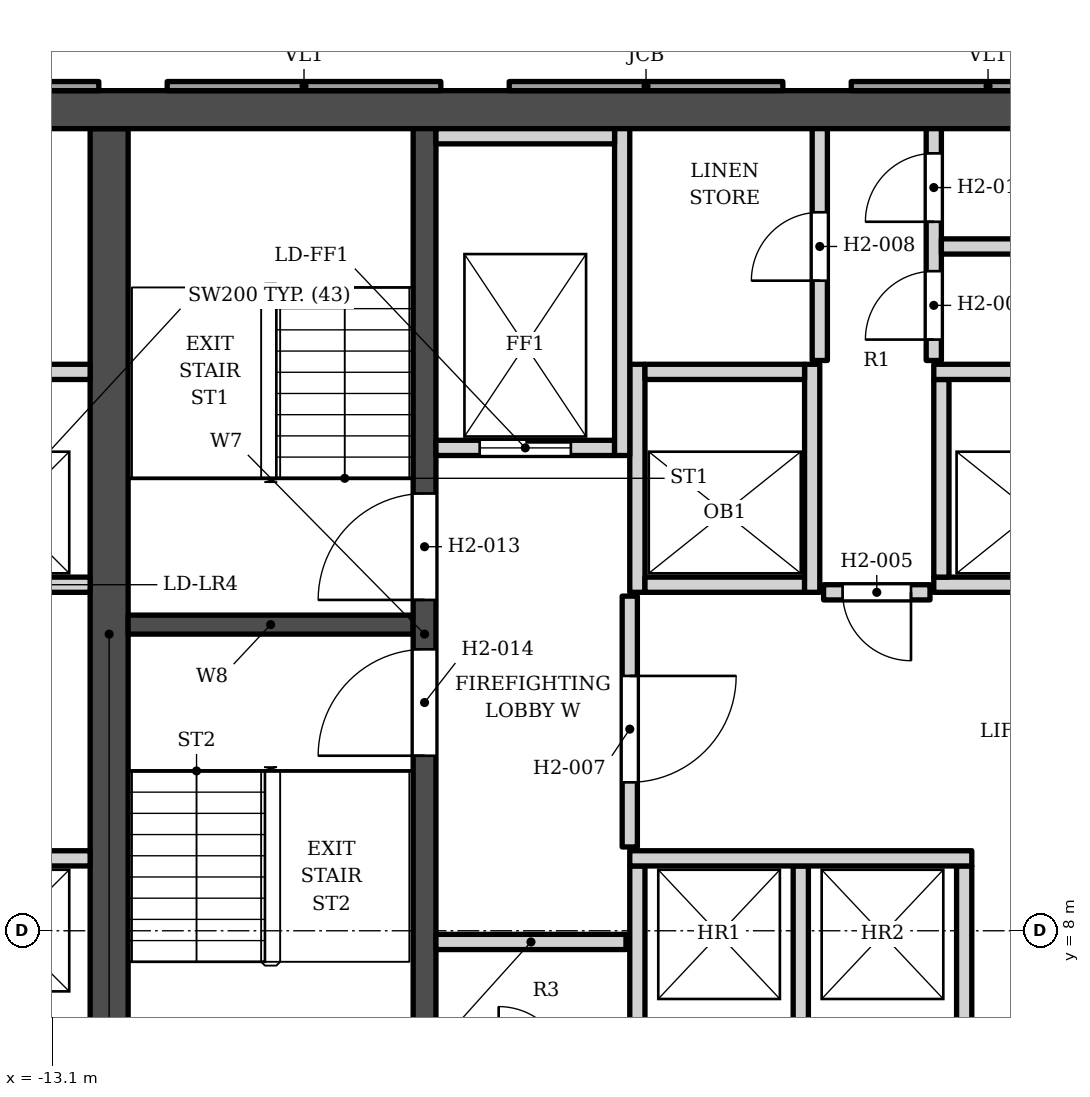
"""IFC4 building model, lengths in metres.
Left out: names, types, materials, properties, quantities, classifications, styles, units other than length and angle.
Written with IfcOpenShell. Run it as: python <this file> out.ifc"""

import sys

from ifc_helpers import new_model, si_unit, direction, frame, frame_2d, origin, place, context, subcontext, project, spatial, polyline, rectangle, outline, extrude, element, fill, save


model = new_model("IFC4")
c1 = context("Model", 3, precision=1e-05, world=origin(), true_north=direction((0.0, 1.0)))
c2 = subcontext(c1, "Body", "Model", "MODEL_VIEW")
j1 = project(units=[si_unit("LENGTHUNIT", "METRE"), si_unit("PLANEANGLEUNIT", "RADIAN")], contexts=[c1])
p1 = place(None, origin())
s1 = spatial("IfcSite", under=j1, at=p1, CompositionType="ELEMENT")
p2 = place(p1, origin())
s2 = spatial("IfcBuilding", under=s1, at=p2, CompositionType="ELEMENT")
p3 = place(p2, frame((0.0, 0.0, 56.2)))
s3 = spatial("IfcBuildingStorey", under=s2, at=p3, CompositionType="ELEMENT", Elevation=56.2)
p4 = place(p3, frame((-16.9, 18.802, 0.0), z_axis=(0.0, 0.0, 1.0), x_axis=(1.0, 0.0, 0.0)))
e1 = element("IfcWall", 1, at=p4, inside=s3, PredefinedType="SHEAR", context=c2, shape_type="SweptSolid", body=[
    extrude(rectangle(XDim=33.8, YDim=0.5, at=frame_2d((16.9, 0.0))), origin(), (0.0, 0.0, 1.0), 3.4),
])
p5 = place(p3, frame((-12.35, 5.253, 0.0), z_axis=(0.0, 0.0, 1.0), x_axis=(0.0, 1.0, 0.0)))
e2 = element("IfcWall", 2, at=p5, inside=s3, PredefinedType="SHEAR", context=c2, shape_type="SweptSolid", body=[
    extrude(rectangle(XDim=13.3, YDim=0.5, at=frame_2d((6.65, 0.0))), origin(), (0.0, 0.0, 1.0), 3.4),
])
p6 = place(p3, frame((-8.2, 5.253, 0.0), z_axis=(0.0, 0.0, 1.0), x_axis=(0.0, 1.0, 0.0)))
e3 = element("IfcWall", 3, at=p6, inside=s3, PredefinedType="SHEAR", context=c2, shape_type="SweptSolid", body=[
    extrude(rectangle(XDim=13.3, YDim=0.3, at=frame_2d((6.65, 0.0))), origin(), (0.0, 0.0, 1.0), 3.4),
])
p7 = place(p6, frame((7.1, 0.0, 0.0)))
e4 = element("IfcOpeningElement", 4, at=p7, cuts=e3, PredefinedType="OPENING", context=c2, shape_type="SweptSolid", body=[
    extrude(rectangle(XDim=1.4, YDim=2.1, at=frame_2d((0.7, 1.05))), frame((0.0, 0.16, 0.0), z_axis=(0.0, -1.0, 0.0), x_axis=(1.0, 0.0, 0.0)), (0.0, 0.0, 1.0), 0.32),
])
p8 = place(p6, frame((5.05, 0.0, 0.0)))
e5 = element("IfcOpeningElement", 5, at=p8, cuts=e3, PredefinedType="OPENING", context=c2, shape_type="SweptSolid", body=[
    extrude(rectangle(XDim=1.4, YDim=2.1, at=frame_2d((0.7, 1.05))), frame((0.0, 0.16, 0.0), z_axis=(0.0, -1.0, 0.0), x_axis=(1.0, 0.0, 0.0)), (0.0, 0.0, 1.0), 0.32),
])
p9 = place(p3, frame((-12.1, 12.028, 0.0), z_axis=(0.0, 0.0, 1.0), x_axis=(1.0, 0.0, 0.0)))
e6 = element("IfcWall", 6, at=p9, inside=s3, PredefinedType="SHEAR", context=c2, shape_type="SweptSolid", body=[
    extrude(rectangle(XDim=3.75, YDim=0.25, at=frame_2d((1.875, 0.0))), origin(), (0.0, 0.0, 1.0), 3.4),
])
p10 = place(p3, origin())
e7 = element("IfcWall", 7, at=p10, inside=s3, PredefinedType="ELEMENTEDWALL", context=c2, shape_type="SweptSolid", body=[
    extrude(outline(polyline([(-2.586, 19.173), (-2.586, 19.052), (1.014, 19.052), (1.014, 19.173), (-2.586, 19.173)])), origin(), (0.0, 0.0, 1.0), 2.65),
])
p11 = place(p3, origin())
e8 = element("IfcWall", 8, at=p11, inside=s3, PredefinedType="SOLIDWALL", context=c2, shape_type="SweptSolid", body=[
    extrude(outline(polyline([(-7.086, 19.173), (-7.086, 19.052), (-3.486, 19.052), (-3.486, 19.173), (-7.086, 19.173)])), origin(), (0.0, 0.0, 1.0), 2.65),
])
p12 = place(p3, origin())
e9 = element("IfcWall", 9, at=p12, inside=s3, PredefinedType="ELEMENTEDWALL", context=c2, shape_type="SweptSolid", body=[
    extrude(outline(polyline([(-11.586, 19.173), (-11.586, 19.052), (-7.986, 19.052), (-7.986, 19.173), (-11.586, 19.173)])), origin(), (0.0, 0.0, 1.0), 2.65),
])
p13 = place(p3, origin())
e10 = element("IfcWall", 10, at=p13, inside=s3, PredefinedType="SOLIDWALL", context=c2, shape_type="SweptSolid", body=[
    extrude(outline(polyline([(-16.086, 19.173), (-16.086, 19.052), (-12.486, 19.052), (-12.486, 19.173), (-16.086, 19.173)])), origin(), (0.0, 0.0, 1.0), 2.65),
])
for number, where, z_axis, x_axis in (
    (11, (-5.4, 6.353, 0.0), (0.0, 0.0, 1.0), (0.0, 1.0, 0.0)),
    (12, (-3.25, 6.353, 0.0), (0.0, 0.0, 1.0), (0.0, 1.0, 0.0)),
    (13, (-1.1, 6.353, 0.0), (0.0, 0.0, 1.0), (0.0, 1.0, 0.0)),
    (14, (-8.05, 7.853, 0.0), (0.0, 0.0, 1.0), (1.0, 0.0, 0.0)),
):
    element("IfcWall", number, at=place(p3, frame(where, z_axis=z_axis, x_axis=x_axis)), inside=s3, PredefinedType="SOLIDWALL", context=c2, shape_type="SweptSolid", body=[
        extrude(rectangle(XDim=2.5, YDim=0.2, at=frame_2d((1.25, 0.0))), origin(), (0.0, 0.0, 1.0), 3.23),
    ])
p14 = place(p3, frame((-16.9, 8.953, 0.0), z_axis=(0.0, 0.0, 1.0), x_axis=(1.0, 0.0, 0.0)))
e15 = element("IfcWall", 15, at=p14, inside=s3, PredefinedType="SOLIDWALL", context=c2, shape_type="SweptSolid", body=[
    extrude(rectangle(XDim=4.3, YDim=0.2, at=frame_2d((2.15, 0.0))), origin(), (0.0, 0.0, 1.0), 3.23),
])
p15 = place(p14, frame((2.675, 0.0, 0.0)))
e16 = element("IfcOpeningElement", 16, at=p15, cuts=e15, PredefinedType="OPENING", context=c2, shape_type="SweptSolid", body=[
    extrude(rectangle(XDim=1.1, YDim=2.1, at=frame_2d((0.55, 1.05))), frame((0.0, 0.11, 0.0), z_axis=(0.0, -1.0, 0.0), x_axis=(1.0, 0.0, 0.0)), (0.0, 0.0, 1.0), 0.22),
])
p16 = place(p14, frame((0.425, 0.0, 0.0)))
e17 = element("IfcOpeningElement", 17, at=p16, cuts=e15, PredefinedType="OPENING", context=c2, shape_type="SweptSolid", body=[
    extrude(rectangle(XDim=1.1, YDim=2.1, at=frame_2d((0.55, 1.05))), frame((0.0, 0.11, 0.0), z_axis=(0.0, -1.0, 0.0), x_axis=(1.0, 0.0, 0.0)), (0.0, 0.0, 1.0), 0.22),
])
p17 = place(p3, frame((-5.5, 8.953, 0.0), z_axis=(0.0, 0.0, 1.0), x_axis=(1.0, 0.0, 0.0)))
e18 = element("IfcWall", 18, at=p17, inside=s3, PredefinedType="SOLIDWALL", context=c2, shape_type="SweptSolid", body=[
    extrude(rectangle(XDim=4.5, YDim=0.2, at=frame_2d((2.25, 0.0))), origin(), (0.0, 0.0, 1.0), 3.23),
])
p18 = place(p3, frame((-5.5, 9.103, 0.0), z_axis=(0.0, 0.0, 1.0), x_axis=(0.0, 1.0, 0.0)))
e19 = element("IfcWall", 19, at=p18, inside=s3, PredefinedType="SOLIDWALL", context=c2, shape_type="SweptSolid", body=[
    extrude(rectangle(XDim=3.3, YDim=0.2, at=frame_2d((1.65, 0.0))), origin(), (0.0, 0.0, 1.0), 3.23),
])
p19 = place(p18, frame((0.85, 0.0, 0.0)))
e20 = element("IfcOpeningElement", 20, at=p19, cuts=e19, PredefinedType="OPENING", context=c2, shape_type="SweptSolid", body=[
    extrude(rectangle(XDim=1.4, YDim=2.1, at=frame_2d((0.7, 1.05))), frame((0.0, 0.11, 0.0), z_axis=(0.0, -1.0, 0.0), x_axis=(1.0, 0.0, 0.0)), (0.0, 0.0, 1.0), 0.22),
])
p20 = place(p3, frame((-2.95, 12.453, 0.0), z_axis=(0.0, 0.0, 1.0), x_axis=(1.0, 0.0, 0.0)))
e21 = element("IfcWall", 21, at=p20, inside=s3, PredefinedType="SOLIDWALL", context=c2, shape_type="SweptSolid", body=[
    extrude(rectangle(XDim=1.4, YDim=0.2, at=frame_2d((0.7, 0.0))), origin(), (0.0, 0.0, 1.0), 3.23),
])
p21 = place(p20, frame((0.25, 0.0, 0.0)))
e22 = element("IfcOpeningElement", 22, at=p21, cuts=e21, PredefinedType="OPENING", context=c2, shape_type="SweptSolid", body=[
    extrude(rectangle(XDim=0.9, YDim=2.1, at=frame_2d((0.45, 1.05))), frame((0.0, 0.11, 0.0), z_axis=(0.0, -1.0, 0.0), x_axis=(1.0, 0.0, 0.0)), (0.0, 0.0, 1.0), 0.22),
])
p22 = place(p3, frame((-16.9, 12.552, 0.0), z_axis=(0.0, 0.0, 1.0), x_axis=(1.0, 0.0, 0.0)))
e23 = element("IfcWall", 23, at=p22, inside=s3, PredefinedType="SOLIDWALL", context=c2, shape_type="SweptSolid", body=[
    extrude(rectangle(XDim=4.3, YDim=0.2, at=frame_2d((2.15, 0.0))), origin(), (0.0, 0.0, 1.0), 3.23),
])
p23 = place(p22, frame((2.675, 0.0, 0.0)))
e24 = element("IfcOpeningElement", 24, at=p23, cuts=e23, PredefinedType="OPENING", context=c2, shape_type="SweptSolid", body=[
    extrude(rectangle(XDim=1.1, YDim=2.1, at=frame_2d((0.55, 1.05))), frame((0.0, 0.11, 0.0), z_axis=(0.0, -1.0, 0.0), x_axis=(1.0, 0.0, 0.0)), (0.0, 0.0, 1.0), 0.22),
])
p24 = place(p22, frame((0.425, 0.0, 0.0)))
e25 = element("IfcOpeningElement", 25, at=p24, cuts=e23, PredefinedType="OPENING", context=c2, shape_type="SweptSolid", body=[
    extrude(rectangle(XDim=1.1, YDim=2.1, at=frame_2d((0.55, 1.05))), frame((0.0, 0.11, 0.0), z_axis=(0.0, -1.0, 0.0), x_axis=(1.0, 0.0, 0.0)), (0.0, 0.0, 1.0), 0.22),
])
p25 = place(p3, frame((-5.4, 12.453, 0.0), z_axis=(0.0, 0.0, 1.0), x_axis=(0.0, 1.0, 0.0)))
e26 = element("IfcWall", 26, at=p25, inside=s3, PredefinedType="SOLIDWALL", context=c2, shape_type="SweptSolid", body=[
    extrude(rectangle(XDim=3.0, YDim=0.2, at=frame_2d((1.5, 0.0))), origin(), (0.0, 0.0, 1.0), 3.23),
])
p26 = place(p3, frame((-5.3, 12.552, 0.0), z_axis=(0.0, 0.0, 1.0), x_axis=(1.0, 0.0, 0.0)))
e27 = element("IfcWall", 27, at=p26, inside=s3, PredefinedType="SOLIDWALL", context=c2, shape_type="SweptSolid", body=[
    extrude(rectangle(XDim=2.1, YDim=0.2, at=frame_2d((1.05, 0.0))), origin(), (0.0, 0.0, 1.0), 3.23),
])
p27 = place(p3, frame((-3.1, 12.453, 0.0), z_axis=(0.0, 0.0, 1.0), x_axis=(0.0, 1.0, 0.0)))
e28 = element("IfcWall", 28, at=p27, inside=s3, PredefinedType="SOLIDWALL", context=c2, shape_type="SweptSolid", body=[
    extrude(rectangle(XDim=3.0, YDim=0.2, at=frame_2d((1.5, 0.0))), origin(), (0.0, 0.0, 1.0), 3.23),
])
p28 = place(p3, frame((-1.5, 12.552, 0.0), z_axis=(0.0, 0.0, 1.0), x_axis=(1.0, 0.0, 0.0)))
e29 = element("IfcWall", 29, at=p28, inside=s3, PredefinedType="SOLIDWALL", context=c2, shape_type="SweptSolid", body=[
    extrude(rectangle(XDim=7.0, YDim=0.2, at=frame_2d((3.5, 0.0))), origin(), (0.0, 0.0, 1.0), 3.23),
])
p29 = place(p3, frame((-1.4, 12.653, 0.0), z_axis=(0.0, 0.0, 1.0), x_axis=(0.0, 1.0, 0.0)))
e30 = element("IfcWall", 30, at=p29, inside=s3, PredefinedType="SOLIDWALL", context=c2, shape_type="SweptSolid", body=[
    extrude(rectangle(XDim=2.6, YDim=0.2, at=frame_2d((1.3, 0.0))), origin(), (0.0, 0.0, 1.0), 3.23),
])
p30 = place(p3, frame((-8.05, 14.353, 0.0), z_axis=(0.0, 0.0, 1.0), x_axis=(1.0, 0.0, 0.0)))
e31 = element("IfcWall", 31, at=p30, inside=s3, PredefinedType="SOLIDWALL", context=c2, shape_type="SweptSolid", body=[
    extrude(rectangle(XDim=2.35, YDim=0.2, at=frame_2d((1.175, 0.0))), origin(), (0.0, 0.0, 1.0), 3.23),
])
p31 = place(p30, frame((0.575, 0.0, 0.0)))
e32 = element("IfcOpeningElement", 32, at=p31, cuts=e31, PredefinedType="OPENING", context=c2, shape_type="SweptSolid", body=[
    extrude(rectangle(XDim=1.2, YDim=2.1, at=frame_2d((0.6, 1.05))), frame((0.0, 0.11, 0.0), z_axis=(0.0, -1.0, 0.0), x_axis=(1.0, 0.0, 0.0)), (0.0, 0.0, 1.0), 0.22),
])
for number, where, z_axis, x_axis in (
    (33, (-5.6, 14.253, 0.0), (0.0, 0.0, 1.0), (0.0, 1.0, 0.0)),
    (34, (-16.9, 15.353, 0.0), (0.0, 0.0, 1.0), (1.0, 0.0, 0.0)),
):
    element("IfcWall", number, at=place(p3, frame(where, z_axis=z_axis, x_axis=x_axis)), inside=s3, PredefinedType="SOLIDWALL", context=c2, shape_type="SweptSolid", body=[
        extrude(rectangle(XDim=4.3, YDim=0.2, at=frame_2d((2.15, 0.0))), origin(), (0.0, 0.0, 1.0), 3.23),
    ])
p32 = place(p3, frame((-5.3, 15.353, 0.0), z_axis=(0.0, 0.0, 1.0), x_axis=(1.0, 0.0, 0.0)))
e35 = element("IfcWall", 35, at=p32, inside=s3, PredefinedType="SOLIDWALL", context=c2, shape_type="SweptSolid", body=[
    extrude(rectangle(XDim=2.1, YDim=0.2, at=frame_2d((1.05, 0.0))), origin(), (0.0, 0.0, 1.0), 3.23),
])
p33 = place(p3, frame((-1.5, 15.353, 0.0), z_axis=(0.0, 0.0, 1.0), x_axis=(1.0, 0.0, 0.0)))
e36 = element("IfcWall", 36, at=p33, inside=s3, PredefinedType="SOLIDWALL", context=c2, shape_type="SweptSolid", body=[
    extrude(rectangle(XDim=7.2, YDim=0.2, at=frame_2d((3.6, 0.0))), origin(), (0.0, 0.0, 1.0), 3.23),
])
p34 = place(p3, frame((-3.0, 15.503, 0.0), z_axis=(0.0, 0.0, 1.0), x_axis=(0.0, 1.0, 0.0)))
e37 = element("IfcWall", 37, at=p34, inside=s3, PredefinedType="SOLIDWALL", context=c2, shape_type="SweptSolid", body=[
    extrude(rectangle(XDim=3.05, YDim=0.2, at=frame_2d((1.525, 0.0))), origin(), (0.0, 0.0, 1.0), 3.23),
])
p35 = place(p34, frame((1.05, 0.0, 0.0)))
e38 = element("IfcOpeningElement", 38, at=p35, cuts=e37, PredefinedType="OPENING", context=c2, shape_type="SweptSolid", body=[
    extrude(rectangle(XDim=0.9, YDim=2.1, at=frame_2d((0.45, 1.05))), frame((0.0, 0.11, 0.0), z_axis=(0.0, -1.0, 0.0), x_axis=(1.0, 0.0, 0.0)), (0.0, 0.0, 1.0), 0.22),
])
p36 = place(p3, frame((-1.5, 15.503, 0.0), z_axis=(0.0, 0.0, 1.0), x_axis=(0.0, 1.0, 0.0)))
e39 = element("IfcWall", 39, at=p36, inside=s3, PredefinedType="SOLIDWALL", context=c2, shape_type="SweptSolid", body=[
    extrude(rectangle(XDim=3.05, YDim=0.2, at=frame_2d((1.525, 0.0))), origin(), (0.0, 0.0, 1.0), 3.23),
])
p37 = place(p36, frame((0.275, 0.0, 0.0)))
e40 = element("IfcOpeningElement", 40, at=p37, cuts=e39, PredefinedType="OPENING", context=c2, shape_type="SweptSolid", body=[
    extrude(rectangle(XDim=0.9, YDim=2.1, at=frame_2d((0.45, 1.05))), frame((0.0, 0.11, 0.0), z_axis=(0.0, -1.0, 0.0), x_axis=(1.0, 0.0, 0.0)), (0.0, 0.0, 1.0), 0.22),
])
p38 = place(p36, frame((1.825, 0.0, 0.0)))
e41 = element("IfcOpeningElement", 41, at=p38, cuts=e39, PredefinedType="OPENING", context=c2, shape_type="SweptSolid", body=[
    extrude(rectangle(XDim=0.9, YDim=2.1, at=frame_2d((0.45, 1.05))), frame((0.0, 0.11, 0.0), z_axis=(0.0, -1.0, 0.0), x_axis=(1.0, 0.0, 0.0)), (0.0, 0.0, 1.0), 0.22),
])
p39 = place(p3, frame((-1.4, 17.003, 0.0), z_axis=(0.0, 0.0, 1.0), x_axis=(1.0, 0.0, 0.0)))
e42 = element("IfcWall", 42, at=p39, inside=s3, PredefinedType="SOLIDWALL", context=c2, shape_type="SweptSolid", body=[
    extrude(rectangle(XDim=6.85, YDim=0.2, at=frame_2d((3.425, 0.0))), origin(), (0.0, 0.0, 1.0), 3.23),
])
p40 = place(p3, frame((-8.05, 18.453, 0.0), z_axis=(0.0, 0.0, 1.0), x_axis=(1.0, 0.0, 0.0)))
e43 = element("IfcWall", 43, at=p40, inside=s3, PredefinedType="SOLIDWALL", context=c2, shape_type="SweptSolid", body=[
    extrude(rectangle(XDim=2.35, YDim=0.2, at=frame_2d((1.175, 0.0))), origin(), (0.0, 0.0, 1.0), 3.23),
])
p41 = place(p31, origin())
e44 = element("IfcDoor", 44, at=p41, inside=s3, OperationType="DOUBLE_DOOR_SLIDING", PredefinedType="DOOR", context=c2, shape_type="SweptSolid", body=[
    extrude(rectangle(XDim=1.2, YDim=2.1, at=frame_2d((0.6, 1.05))), frame((0.0, 0.025, 0.0), z_axis=(0.0, -1.0, 0.0), x_axis=(1.0, 0.0, 0.0)), (0.0, 0.0, 1.0), 0.05),
])
fill(e32, e44)
p42 = place(p7, origin())
e45 = element("IfcDoor", 45, at=p42, inside=s3, OperationType="SINGLE_SWING_LEFT", PredefinedType="DOOR", context=c2, shape_type="SweptSolid", body=[
    extrude(rectangle(XDim=1.4, YDim=2.1, at=frame_2d((0.7, 1.05))), frame((0.0, 0.025, 0.0), z_axis=(0.0, -1.0, 0.0), x_axis=(1.0, 0.0, 0.0)), (0.0, 0.0, 1.0), 0.05),
])
fill(e4, e45)
p43 = place(p8, origin())
e46 = element("IfcDoor", 46, at=p43, inside=s3, OperationType="SINGLE_SWING_LEFT", PredefinedType="DOOR", context=c2, shape_type="SweptSolid", body=[
    extrude(rectangle(XDim=1.4, YDim=2.1, at=frame_2d((0.7, 1.05))), frame((0.0, 0.025, 0.0), z_axis=(0.0, -1.0, 0.0), x_axis=(1.0, 0.0, 0.0)), (0.0, 0.0, 1.0), 0.05),
])
fill(e5, e46)
p44 = place(p21, origin())
e47 = element("IfcDoor", 47, at=p44, inside=s3, OperationType="SINGLE_SWING_RIGHT", PredefinedType="DOOR", context=c2, shape_type="SweptSolid", body=[
    extrude(rectangle(XDim=0.9, YDim=2.1, at=frame_2d((0.45, 1.05))), frame((0.0, 0.025, 0.0), z_axis=(0.0, -1.0, 0.0), x_axis=(1.0, 0.0, 0.0)), (0.0, 0.0, 1.0), 0.05),
])
fill(e22, e47)
p45 = place(p19, origin())
e48 = element("IfcDoor", 48, at=p45, inside=s3, OperationType="SINGLE_SWING_RIGHT", PredefinedType="DOOR", context=c2, shape_type="SweptSolid", body=[
    extrude(rectangle(XDim=1.4, YDim=2.1, at=frame_2d((0.7, 1.05))), frame((0.0, 0.025, 0.0), z_axis=(0.0, -1.0, 0.0), x_axis=(1.0, 0.0, 0.0)), (0.0, 0.0, 1.0), 0.05),
])
fill(e20, e48)
p46 = place(p35, origin())
e49 = element("IfcDoor", 49, at=p46, inside=s3, OperationType="SINGLE_SWING_LEFT", PredefinedType="DOOR", context=c2, shape_type="SweptSolid", body=[
    extrude(rectangle(XDim=0.9, YDim=2.1, at=frame_2d((0.45, 1.05))), frame((0.0, 0.025, 0.0), z_axis=(0.0, -1.0, 0.0), x_axis=(1.0, 0.0, 0.0)), (0.0, 0.0, 1.0), 0.05),
])
fill(e38, e49)
p47 = place(p37, origin())
e50 = element("IfcDoor", 50, at=p47, inside=s3, OperationType="SINGLE_SWING_LEFT", PredefinedType="DOOR", context=c2, shape_type="SweptSolid", body=[
    extrude(rectangle(XDim=0.9, YDim=2.1, at=frame_2d((0.45, 1.05))), frame((0.0, 0.025, 0.0), z_axis=(0.0, -1.0, 0.0), x_axis=(1.0, 0.0, 0.0)), (0.0, 0.0, 1.0), 0.05),
])
fill(e40, e50)
p48 = place(p38, origin())
e51 = element("IfcDoor", 51, at=p48, inside=s3, OperationType="SINGLE_SWING_LEFT", PredefinedType="DOOR", context=c2, shape_type="SweptSolid", body=[
    extrude(rectangle(XDim=0.9, YDim=2.1, at=frame_2d((0.45, 1.05))), frame((0.0, 0.025, 0.0), z_axis=(0.0, -1.0, 0.0), x_axis=(1.0, 0.0, 0.0)), (0.0, 0.0, 1.0), 0.05),
])
fill(e41, e51)
save(model, sys.argv[1])
